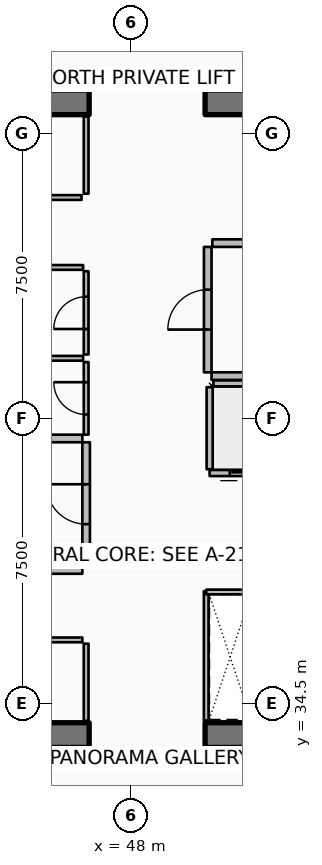
"""IFC4 building model, lengths in metres.
Left out: names, types, materials, properties, quantities, classifications, styles, units other than length and angle.
Written with IfcOpenShell. Run it as: python <this file> out.ifc"""

import sys

from ifc_helpers import new_model, si_unit, direction, frame, frame_2d, origin, place, context, subcontext, project, spatial, rectangle, extrude, element, fill, save


model = new_model("IFC4")
c1 = context("Model", 3, precision=1e-05, world=origin(), true_north=direction((0.0, 1.0)))
c2 = subcontext(c1, "Body", "Model", "MODEL_VIEW")
j1 = project(units=[si_unit("LENGTHUNIT", "METRE"), si_unit("PLANEANGLEUNIT", "RADIAN")], contexts=[c1])
p1 = place(None, origin())
s1 = spatial("IfcSite", under=j1, at=p1, CompositionType="ELEMENT")
p2 = place(p1, origin())
s2 = spatial("IfcBuilding", under=s1, at=p2, CompositionType="ELEMENT")
p3 = place(p2, frame((0.0, 0.0, 252.1)))
s3 = spatial("IfcBuildingStorey", under=s2, at=p3, CompositionType="ELEMENT", Elevation=252.1)
for number, where, z_axis, x_axis in (
    (1, (37.15, 33.675, 0.0), (0.0, 0.0, 1.0), (1.0, 0.0, 0.0)),
    (2, (49.95, 33.675, 0.0), (0.0, 0.0, 1.0), (1.0, 0.0, 0.0)),
    (3, (37.15, 50.325, 0.0), (0.0, 0.0, 1.0), (1.0, 0.0, 0.0)),
    (4, (49.95, 50.325, 0.0), (0.0, 0.0, 1.0), (1.0, 0.0, 0.0)),
):
    element("IfcWall", number, at=place(p3, frame(where, z_axis=z_axis, x_axis=x_axis)), inside=s3, PredefinedType="SHEAR", context=c2, shape_type="SweptSolid", body=[
        extrude(rectangle(XDim=9.75, YDim=0.65, at=frame_2d((4.875, 0.0))), origin(), (0.0, 0.0, 1.0), 3.85),
    ])
p4 = place(p3, frame((52.23, 40.57, 0.0), z_axis=(0.0, 0.0, 1.0), x_axis=(-1.0, 0.0, 0.0)))
e5 = element("IfcWall", 5, at=p4, inside=s3, PredefinedType="PARTITIONING", context=c2, shape_type="SweptSolid", body=[
    extrude(rectangle(XDim=2.16, YDim=0.16, at=frame_2d((1.08, 0.0))), origin(), (0.0, 0.0, 1.0), 3.59),
])
p5 = place(p4, frame((0.53, 0.0, 0.0)))
e6 = element("IfcOpeningElement", 6, at=p5, cuts=e5, PredefinedType="OPENING", context=c2, shape_type="SweptSolid", body=[
    extrude(rectangle(XDim=1.1, YDim=2.1, at=frame_2d((0.55, 1.05))), frame((0.0, 0.09, 0.0), z_axis=(0.0, -1.0, 0.0), x_axis=(1.0, 0.0, 0.0)), (0.0, 0.0, 1.0), 0.18),
])
p6 = place(p3, frame((50.07, 40.67, 0.0), z_axis=(0.0, 0.0, 1.0), x_axis=(0.0, 1.0, 0.0)))
e7 = element("IfcWall", 7, at=p6, inside=s3, PredefinedType="PARTITIONING", context=c2, shape_type="SweptSolid", body=[
    extrude(rectangle(XDim=2.16, YDim=0.16, at=frame_2d((1.08, 0.0))), origin(), (0.0, 0.0, 1.0), 3.59),
])
p7 = place(p3, frame((50.17, 42.93, 0.0), z_axis=(0.0, 0.0, 1.0), x_axis=(1.0, 0.0, 0.0)))
e8 = element("IfcWall", 8, at=p7, inside=s3, PredefinedType="PARTITIONING", context=c2, shape_type="SweptSolid", body=[
    extrude(rectangle(XDim=1.96, YDim=0.16, at=frame_2d((0.98, 0.0))), origin(), (0.0, 0.0, 1.0), 3.59),
])
p8 = place(p3, frame((46.82, 34.05, 0.0), z_axis=(0.0, 0.0, 1.0), x_axis=(0.0, 1.0, 0.0)))
e9 = element("IfcWall", 9, at=p8, inside=s3, PredefinedType="PARTITIONING", context=c2, shape_type="SweptSolid", body=[
    extrude(rectangle(XDim=2.03, YDim=0.125, at=frame_2d((1.015, 0.0))), origin(), (0.0, 0.0, 1.0), 3.03),
])
p9 = place(p3, frame((42.6, 36.18, 0.0), z_axis=(0.0, 0.0, 1.0), x_axis=(1.0, 0.0, 0.0)))
e10 = element("IfcWall", 10, at=p9, inside=s3, PredefinedType="PARTITIONING", context=c2, shape_type="SweptSolid", body=[
    extrude(rectangle(XDim=4.12, YDim=0.125, at=frame_2d((2.06, 0.0))), origin(), (0.0, 0.0, 1.0), 3.03),
])
p10 = place(p9, frame((1.635, 0.0, 0.0)))
e11 = element("IfcOpeningElement", 11, at=p10, cuts=e10, PredefinedType="OPENING", context=c2, shape_type="SweptSolid", body=[
    extrude(rectangle(XDim=0.85, YDim=2.06, at=frame_2d((0.425, 1.03))), frame((0.0, 0.073, 0.0), z_axis=(0.0, -1.0, 0.0), x_axis=(1.0, 0.0, 0.0)), (0.0, 0.0, 1.0), 0.145),
])
p11 = place(p3, frame((46.82, 47.92, 0.0), z_axis=(0.0, 0.0, 1.0), x_axis=(0.0, 1.0, 0.0)))
e12 = element("IfcWall", 12, at=p11, inside=s3, PredefinedType="PARTITIONING", context=c2, shape_type="SweptSolid", body=[
    extrude(rectangle(XDim=2.03, YDim=0.125, at=frame_2d((1.015, 0.0))), origin(), (0.0, 0.0, 1.0), 3.03),
])
p12 = place(p3, frame((37.92, 47.82, 0.0), z_axis=(0.0, 0.0, 1.0), x_axis=(1.0, 0.0, 0.0)))
e13 = element("IfcWall", 13, at=p12, inside=s3, PredefinedType="PARTITIONING", context=c2, shape_type="SweptSolid", body=[
    extrude(rectangle(XDim=8.78, YDim=0.125, at=frame_2d((4.39, 0.0))), origin(), (0.0, 0.0, 1.0), 3.03),
])
p13 = place(p12, frame((3.965, 0.0, 0.0)))
e14 = element("IfcOpeningElement", 14, at=p13, cuts=e13, PredefinedType="OPENING", context=c2, shape_type="SweptSolid", body=[
    extrude(rectangle(XDim=0.85, YDim=2.06, at=frame_2d((0.425, 1.03))), frame((0.0, 0.073, 0.0), z_axis=(0.0, -1.0, 0.0), x_axis=(1.0, 0.0, 0.0)), (0.0, 0.0, 1.0), 0.145),
])
p14 = place(p3, frame((41.35, 38.02, 0.0), z_axis=(0.0, 0.0, 1.0), x_axis=(1.0, 0.0, 0.0)))
e15 = element("IfcWall", 15, at=p14, inside=s3, PredefinedType="PARTITIONING", context=c2, shape_type="SweptSolid", body=[
    extrude(rectangle(XDim=5.37, YDim=0.2, at=frame_2d((2.685, 0.0))), origin(), (0.0, 0.0, 1.0), 3.59),
])
p15 = place(p3, frame((43.92, 41.48, 0.0), z_axis=(0.0, 0.0, 1.0), x_axis=(1.0, 0.0, 0.0)))
e16 = element("IfcWall", 16, at=p15, inside=s3, PredefinedType="PARTITIONING", context=c2, shape_type="SweptSolid", body=[
    extrude(rectangle(XDim=2.8, YDim=0.2, at=frame_2d((1.4, 0.0))), origin(), (0.0, 0.0, 1.0), 3.59),
])
p16 = place(p3, frame((46.82, 38.12, 0.0), z_axis=(0.0, 0.0, 1.0), x_axis=(0.0, 1.0, 0.0)))
e17 = element("IfcWall", 17, at=p16, inside=s3, PredefinedType="PARTITIONING", context=c2, shape_type="SweptSolid", body=[
    extrude(rectangle(XDim=3.26, YDim=0.2, at=frame_2d((1.63, 0.0))), origin(), (0.0, 0.0, 1.0), 3.59),
])
p17 = place(p16, frame((1.105, 0.0, 0.0)))
e18 = element("IfcOpeningElement", 18, at=p17, cuts=e17, PredefinedType="OPENING", context=c2, shape_type="SweptSolid", body=[
    extrude(rectangle(XDim=1.05, YDim=2.1, at=frame_2d((0.525, 1.05))), frame((0.0, 0.11, 0.0), z_axis=(0.0, -1.0, 0.0), x_axis=(1.0, 0.0, 0.0)), (0.0, 0.0, 1.0), 0.22),
])
p18 = place(p3, frame((50.12, 43.12, 0.0), z_axis=(0.0, 0.0, 1.0), x_axis=(1.0, 0.0, 0.0)))
e19 = element("IfcWall", 19, at=p18, inside=s3, PredefinedType="PARTITIONING", context=c2, shape_type="SweptSolid", body=[
    extrude(rectangle(XDim=8.88, YDim=0.2, at=frame_2d((4.44, 0.0))), origin(), (0.0, 0.0, 1.0), 3.59),
])
p19 = place(p3, frame((50.14, 46.62, 0.0), z_axis=(0.0, 0.0, 1.0), x_axis=(1.0, 0.0, 0.0)))
e20 = element("IfcWall", 20, at=p19, inside=s3, PredefinedType="PARTITIONING", context=c2, shape_type="SweptSolid", body=[
    extrude(rectangle(XDim=1.02, YDim=0.2, at=frame_2d((0.51, 0.0))), origin(), (0.0, 0.0, 1.0), 3.59),
])
p20 = place(p3, frame((50.02, 43.22, 0.0), z_axis=(0.0, 0.0, 1.0), x_axis=(0.0, 1.0, 0.0)))
e21 = element("IfcWall", 21, at=p20, inside=s3, PredefinedType="PARTITIONING", context=c2, shape_type="SweptSolid", body=[
    extrude(rectangle(XDim=3.3, YDim=0.2, at=frame_2d((1.65, 0.0))), origin(), (0.0, 0.0, 1.0), 3.59),
])
p21 = place(p20, frame((1.125, 0.0, 0.0)))
e22 = element("IfcOpeningElement", 22, at=p21, cuts=e21, PredefinedType="OPENING", context=c2, shape_type="SweptSolid", body=[
    extrude(rectangle(XDim=1.05, YDim=2.1, at=frame_2d((0.525, 1.05))), frame((0.0, 0.11, 0.0), z_axis=(0.0, -1.0, 0.0), x_axis=(1.0, 0.0, 0.0)), (0.0, 0.0, 1.0), 0.22),
])
p22 = place(p3, frame((49.98, 34.06, 0.0), z_axis=(0.0, 0.0, 1.0), x_axis=(0.0, 1.0, 0.0)))
e23 = element("IfcWall", 23, at=p22, inside=s3, PredefinedType="PARTITIONING", context=c2, shape_type="SweptSolid", body=[
    extrude(rectangle(XDim=3.4, YDim=0.125, at=frame_2d((1.7, 0.0))), origin(), (0.0, 0.0, 1.0), 3.03),
])
p23 = place(p3, frame((49.98, 37.44, 0.0), z_axis=(0.0, 0.0, 1.0), x_axis=(1.0, 0.0, 0.0)))
e24 = element("IfcWall", 24, at=p23, inside=s3, PredefinedType="PARTITIONING", context=c2, shape_type="SweptSolid", body=[
    extrude(rectangle(XDim=1.26, YDim=0.125, at=frame_2d((0.63, 0.0))), origin(), (0.0, 0.0, 1.0), 3.03),
])
p24 = place(p3, frame((44.03, 43.59, 0.0), z_axis=(0.0, 0.0, 1.0), x_axis=(1.0, 0.0, 0.0)))
e25 = element("IfcWall", 25, at=p24, inside=s3, PredefinedType="PARTITIONING", context=c2, shape_type="SweptSolid", body=[
    extrude(rectangle(XDim=2.71, YDim=0.125, at=frame_2d((1.355, 0.0))), origin(), (0.0, 0.0, 1.0), 3.03),
])
p25 = place(p3, frame((46.82, 41.58, 0.0), z_axis=(0.0, 0.0, 1.0), x_axis=(0.0, 1.0, 0.0)))
e26 = element("IfcWall", 26, at=p25, inside=s3, PredefinedType="PARTITIONING", context=c2, shape_type="SweptSolid", body=[
    extrude(rectangle(XDim=1.91, YDim=0.125, at=frame_2d((0.955, 0.0))), origin(), (0.0, 0.0, 1.0), 3.03),
])
p26 = place(p25, frame((0.53, 0.0, 0.0)))
e27 = element("IfcOpeningElement", 27, at=p26, cuts=e26, PredefinedType="OPENING", context=c2, shape_type="SweptSolid", body=[
    extrude(rectangle(XDim=0.85, YDim=2.06, at=frame_2d((0.425, 1.03))), frame((0.0, 0.073, 0.0), z_axis=(0.0, -1.0, 0.0), x_axis=(1.0, 0.0, 0.0)), (0.0, 0.0, 1.0), 0.145),
])
p27 = place(p3, frame((46.82, 43.69, 0.0), z_axis=(0.0, 0.0, 1.0), x_axis=(0.0, 1.0, 0.0)))
e28 = element("IfcWall", 28, at=p27, inside=s3, PredefinedType="PARTITIONING", context=c2, shape_type="SweptSolid", body=[
    extrude(rectangle(XDim=2.19, YDim=0.125, at=frame_2d((1.095, 0.0))), origin(), (0.0, 0.0, 1.0), 3.03),
])
p28 = place(p27, frame((0.67, 0.0, 0.0)))
e29 = element("IfcOpeningElement", 29, at=p28, cuts=e28, PredefinedType="OPENING", context=c2, shape_type="SweptSolid", body=[
    extrude(rectangle(XDim=0.85, YDim=2.06, at=frame_2d((0.425, 1.03))), frame((0.0, 0.073, 0.0), z_axis=(0.0, -1.0, 0.0), x_axis=(1.0, 0.0, 0.0)), (0.0, 0.0, 1.0), 0.145),
])
p29 = place(p3, frame((45.48, 45.98, 0.0), z_axis=(0.0, 0.0, 1.0), x_axis=(1.0, 0.0, 0.0)))
e30 = element("IfcWall", 30, at=p29, inside=s3, PredefinedType="PARTITIONING", context=c2, shape_type="SweptSolid", body=[
    extrude(rectangle(XDim=1.26, YDim=0.125, at=frame_2d((0.63, 0.0))), origin(), (0.0, 0.0, 1.0), 3.03),
])
p30 = place(p5, origin())
e31 = element("IfcDoor", 31, at=p30, inside=s3, OperationType="DOUBLE_DOOR_SLIDING", PredefinedType="DOOR", context=c2, shape_type="SweptSolid", body=[
    extrude(rectangle(XDim=1.1, YDim=2.1, at=frame_2d((0.55, 1.05))), frame((0.0, 0.025, 0.0), z_axis=(0.0, -1.0, 0.0), x_axis=(1.0, 0.0, 0.0)), (0.0, 0.0, 1.0), 0.05),
])
fill(e6, e31)
p31 = place(p17, origin())
e32 = element("IfcDoor", 32, at=p31, inside=s3, OperationType="SINGLE_SWING_RIGHT", PredefinedType="DOOR", context=c2, shape_type="SweptSolid", body=[
    extrude(rectangle(XDim=1.05, YDim=2.1, at=frame_2d((0.525, 1.05))), frame((0.0, 0.025, 0.0), z_axis=(0.0, -1.0, 0.0), x_axis=(1.0, 0.0, 0.0)), (0.0, 0.0, 1.0), 0.05),
])
fill(e18, e32)
p32 = place(p21, origin())
e33 = element("IfcDoor", 33, at=p32, inside=s3, OperationType="SINGLE_SWING_LEFT", PredefinedType="DOOR", context=c2, shape_type="SweptSolid", body=[
    extrude(rectangle(XDim=1.05, YDim=2.1, at=frame_2d((0.525, 1.05))), frame((0.0, 0.025, 0.0), z_axis=(0.0, -1.0, 0.0), x_axis=(1.0, 0.0, 0.0)), (0.0, 0.0, 1.0), 0.05),
])
fill(e22, e33)
p33 = place(p26, origin())
e34 = element("IfcDoor", 34, at=p33, inside=s3, OperationType="SINGLE_SWING_RIGHT", PredefinedType="DOOR", context=c2, shape_type="SweptSolid", body=[
    extrude(rectangle(XDim=0.85, YDim=2.06, at=frame_2d((0.425, 1.03))), frame((0.0, 0.025, 0.0), z_axis=(0.0, -1.0, 0.0), x_axis=(1.0, 0.0, 0.0)), (0.0, 0.0, 1.0), 0.05),
])
fill(e27, e34)
p34 = place(p28, origin())
e35 = element("IfcDoor", 35, at=p34, inside=s3, OperationType="SINGLE_SWING_LEFT", PredefinedType="DOOR", context=c2, shape_type="SweptSolid", body=[
    extrude(rectangle(XDim=0.85, YDim=2.06, at=frame_2d((0.425, 1.03))), frame((0.0, 0.025, 0.0), z_axis=(0.0, -1.0, 0.0), x_axis=(1.0, 0.0, 0.0)), (0.0, 0.0, 1.0), 0.05),
])
fill(e29, e35)
save(model, sys.argv[1])
